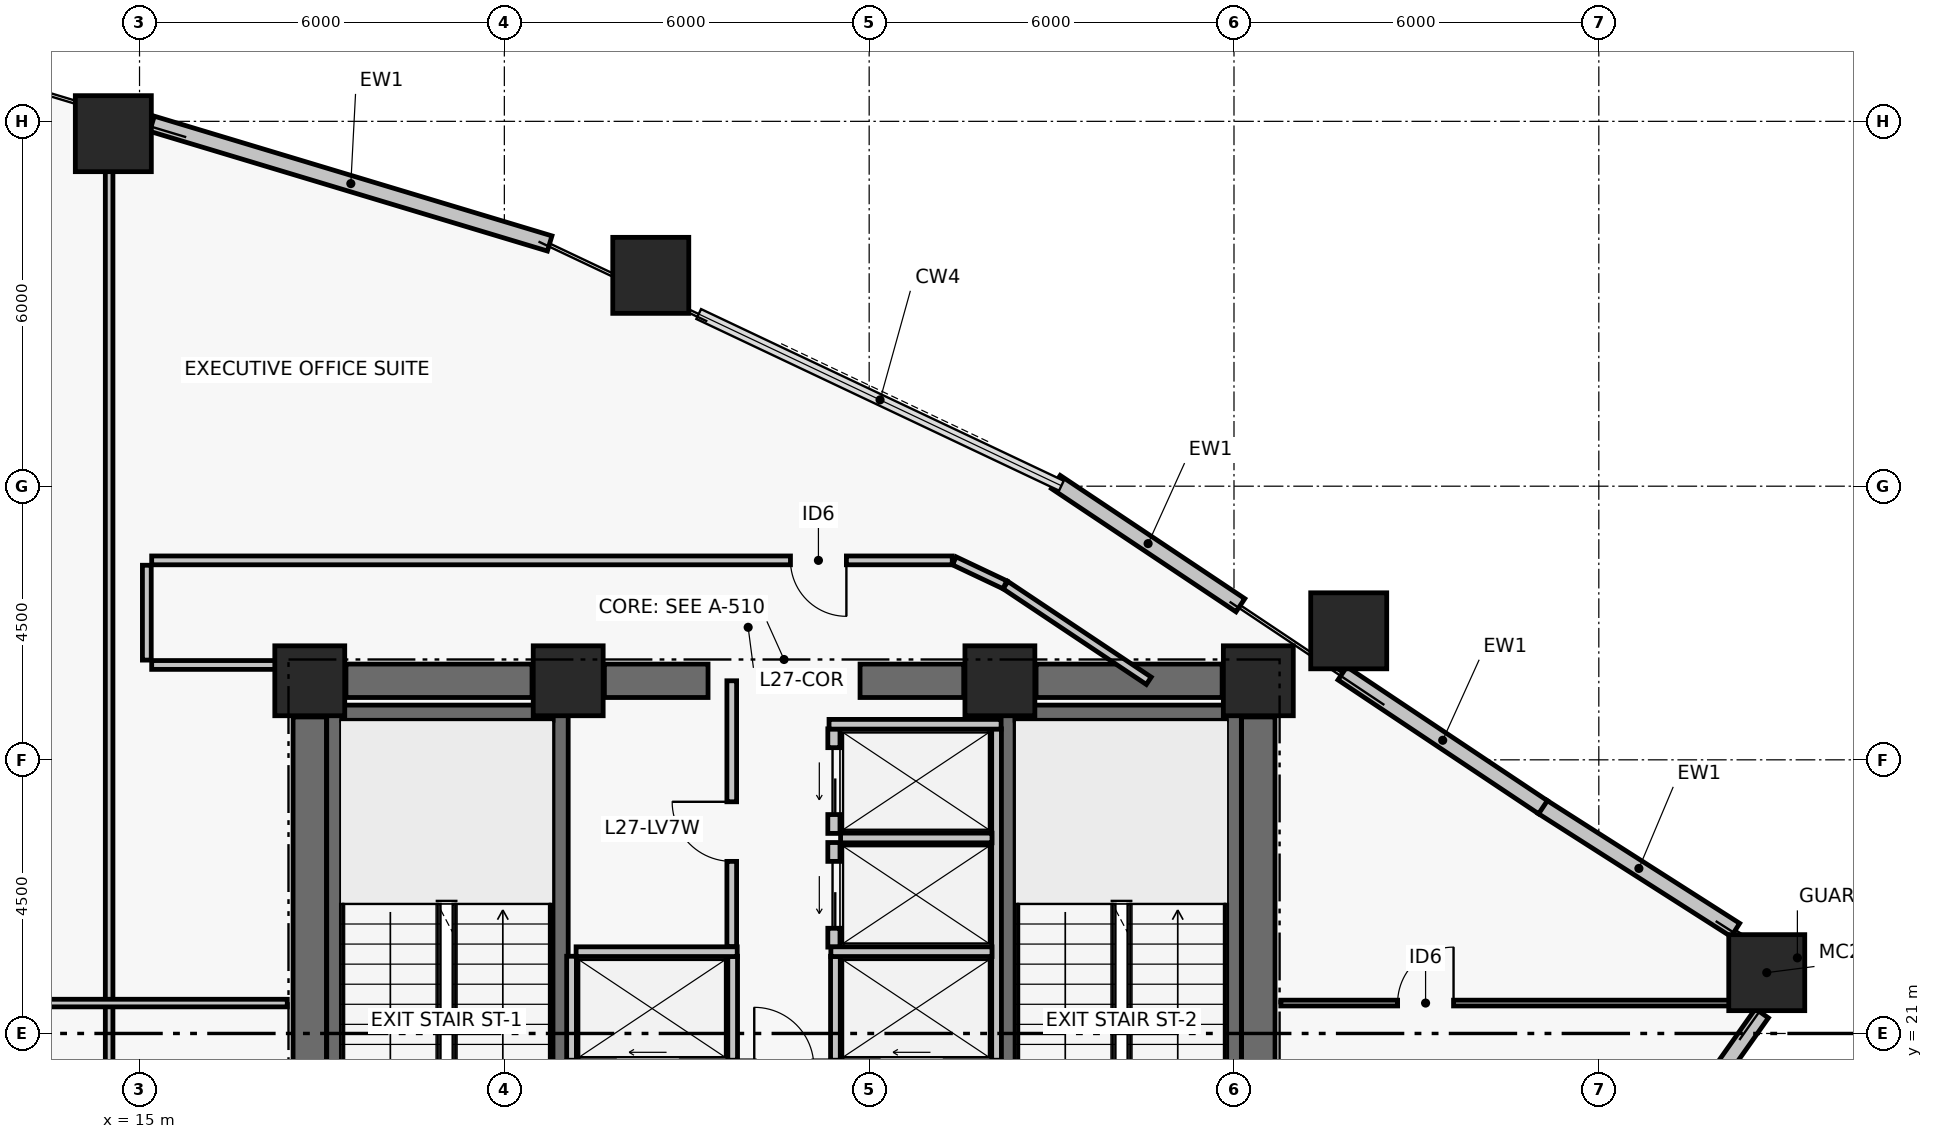
"""IFC4 building model, lengths in metres.
Left out: names, types, materials, properties, quantities, classifications, styles, units other than length and angle.
Written with IfcOpenShell. Run it as: python <this file> out.ifc"""

import sys

from ifc_helpers import new_model, si_unit, direction, frame, frame_2d, origin, origin_2d, place, context, subcontext, project, spatial, rectangle, hollow_rectangle, extrude, element, fill, save


model = new_model("IFC4")
c1 = context("Model", 3, precision=1e-05, world=origin(), true_north=direction((0.0, 1.0)))
c2 = subcontext(c1, "Body", "Model", "MODEL_VIEW")
j1 = project(units=[si_unit("LENGTHUNIT", "METRE"), si_unit("PLANEANGLEUNIT", "RADIAN")], contexts=[c1])
p1 = place(None, origin())
s1 = spatial("IfcSite", under=j1, at=p1, CompositionType="ELEMENT")
p2 = place(p1, origin())
s2 = spatial("IfcBuilding", under=s1, at=p2, CompositionType="ELEMENT")
p3 = place(p2, frame((0.0, 0.0, 111.42)))
s3 = spatial("IfcBuildingStorey", under=s2, at=p3, CompositionType="ELEMENT", Elevation=111.42)
for number, where, z_axis, x_axis in (
    (1, (17.8, 26.8, 0.0), (0.0, 0.0, 1.0), (1.0, 0.0, 0.0)),
    (2, (22.05, 26.8, 0.0), (0.0, 0.0, 1.0), (1.0, 0.0, 0.0)),
    (3, (29.15, 26.8, 0.0), (0.0, 0.0, 1.0), (1.0, 0.0, 0.0)),
    (4, (33.4, 26.8, 0.0), (0.0, 0.0, 1.0), (1.0, 0.0, 0.0)),
):
    element("IfcColumn", number, at=place(p3, frame(where, z_axis=z_axis, x_axis=x_axis)), inside=s3, PredefinedType="COLUMN", context=c2, shape_type="SweptSolid", body=[
        extrude(rectangle(XDim=1.15, YDim=1.15, at=origin_2d()), origin(), (0.0, 0.0, 1.0), 3.72),
    ])
p4 = place(p3, frame((18.395, 26.8, 0.0), z_axis=(0.0, 0.0, 1.0), x_axis=(1.0, 0.0, 0.0)))
e5 = element("IfcWall", 5, at=p4, inside=s3, PredefinedType="SHEAR", context=c2, shape_type="SweptSolid", body=[
    extrude(rectangle(XDim=3.06, YDim=0.55, at=frame_2d((1.53, 0.0))), origin(), (0.0, 0.0, 1.0), 3.47),
])
p5 = place(p3, frame((22.645, 26.8, 0.0), z_axis=(0.0, 0.0, 1.0), x_axis=(1.0, 0.0, 0.0)))
e6 = element("IfcWall", 6, at=p5, inside=s3, PredefinedType="SHEAR", context=c2, shape_type="SweptSolid", body=[
    extrude(rectangle(XDim=1.705, YDim=0.55, at=frame_2d((0.853, 0.0))), origin(), (0.0, 0.0, 1.0), 3.47),
])
p6 = place(p3, frame((26.85, 26.8, 0.0), z_axis=(0.0, 0.0, 1.0), x_axis=(1.0, 0.0, 0.0)))
e7 = element("IfcWall", 7, at=p6, inside=s3, PredefinedType="SHEAR", context=c2, shape_type="SweptSolid", body=[
    extrude(rectangle(XDim=1.705, YDim=0.55, at=frame_2d((0.853, 0.0))), origin(), (0.0, 0.0, 1.0), 3.47),
])
p7 = place(p3, frame((29.745, 26.8, 0.0), z_axis=(0.0, 0.0, 1.0), x_axis=(1.0, 0.0, 0.0)))
e8 = element("IfcWall", 8, at=p7, inside=s3, PredefinedType="SHEAR", context=c2, shape_type="SweptSolid", body=[
    extrude(rectangle(XDim=3.06, YDim=0.55, at=frame_2d((1.53, 0.0))), origin(), (0.0, 0.0, 1.0), 3.47),
])
for number, where, z_axis, x_axis in (
    (9, (17.8, 17.795, 0.0), (0.0, 0.0, 1.0), (0.0, 1.0, 0.0)),
    (10, (33.4, 17.795, 0.0), (0.0, 0.0, 1.0), (0.0, 1.0, 0.0)),
):
    element("IfcWall", number, at=place(p3, frame(where, z_axis=z_axis, x_axis=x_axis)), inside=s3, PredefinedType="SHEAR", context=c2, shape_type="SweptSolid", body=[
        extrude(rectangle(XDim=8.41, YDim=0.55, at=frame_2d((4.205, 0.0))), origin(), (0.0, 0.0, 1.0), 3.47),
    ])
p8 = place(p3, frame((18.204, 17.6, 0.0), z_axis=(0.0, 0.0, 1.0), x_axis=(0.0, 1.0, 0.0)))
e11 = element("IfcWall", 11, at=p8, inside=s3, PredefinedType="SHEAR", context=c2, shape_type="SweptSolid", body=[
    extrude(rectangle(XDim=8.8, YDim=0.25, at=frame_2d((4.4, 0.0))), origin(), (0.0, 0.0, 1.0), 3.47),
])
p9 = place(p3, frame((21.925, 17.6, 0.0), z_axis=(0.0, 0.0, 1.0), x_axis=(0.0, 1.0, 0.0)))
e12 = element("IfcWall", 12, at=p9, inside=s3, PredefinedType="SHEAR", context=c2, shape_type="SweptSolid", body=[
    extrude(rectangle(XDim=8.8, YDim=0.25, at=frame_2d((4.4, 0.0))), origin(), (0.0, 0.0, 1.0), 3.47),
])
p10 = place(p9, frame((0.35, 0.0, 0.0)))
e13 = element("IfcOpeningElement", 13, at=p10, cuts=e12, PredefinedType="OPENING", context=c2, shape_type="SweptSolid", body=[
    extrude(rectangle(XDim=1.05, YDim=2.08, at=frame_2d((0.525, 1.04))), frame((0.0, 0.135, 0.0), z_axis=(0.0, -1.0, 0.0), x_axis=(1.0, 0.0, 0.0)), (0.0, 0.0, 1.0), 0.27),
])
p11 = place(p3, frame((18.329, 26.275, 0.0), z_axis=(0.0, 0.0, 1.0), x_axis=(1.0, 0.0, 0.0)))
e14 = element("IfcWall", 14, at=p11, inside=s3, PredefinedType="SHEAR", context=c2, shape_type="SweptSolid", body=[
    extrude(rectangle(XDim=3.471, YDim=0.25, at=frame_2d((1.735, 0.0))), origin(), (0.0, 0.0, 1.0), 3.47),
])
p12 = place(p3, frame((29.275, 17.6, 0.0), z_axis=(0.0, 0.0, 1.0), x_axis=(0.0, 1.0, 0.0)))
e15 = element("IfcWall", 15, at=p12, inside=s3, PredefinedType="SHEAR", context=c2, shape_type="SweptSolid", body=[
    extrude(rectangle(XDim=8.8, YDim=0.25, at=frame_2d((4.4, 0.0))), origin(), (0.0, 0.0, 1.0), 3.47),
])
p13 = place(p12, frame((0.35, 0.0, 0.0)))
e16 = element("IfcOpeningElement", 16, at=p13, cuts=e15, PredefinedType="OPENING", context=c2, shape_type="SweptSolid", body=[
    extrude(rectangle(XDim=1.05, YDim=2.08, at=frame_2d((0.525, 1.04))), frame((0.0, 0.135, 0.0), z_axis=(0.0, -1.0, 0.0), x_axis=(1.0, 0.0, 0.0)), (0.0, 0.0, 1.0), 0.27),
])
p14 = place(p3, frame((32.996, 17.6, 0.0), z_axis=(0.0, 0.0, 1.0), x_axis=(0.0, 1.0, 0.0)))
e17 = element("IfcWall", 17, at=p14, inside=s3, PredefinedType="SHEAR", context=c2, shape_type="SweptSolid", body=[
    extrude(rectangle(XDim=8.8, YDim=0.25, at=frame_2d((4.4, 0.0))), origin(), (0.0, 0.0, 1.0), 3.47),
])
p15 = place(p3, frame((29.4, 26.275, 0.0), z_axis=(0.0, 0.0, 1.0), x_axis=(1.0, 0.0, 0.0)))
e18 = element("IfcWall", 18, at=p15, inside=s3, PredefinedType="SHEAR", context=c2, shape_type="SweptSolid", body=[
    extrude(rectangle(XDim=3.471, YDim=0.25, at=frame_2d((1.736, 0.0))), origin(), (0.0, 0.0, 1.0), 3.47),
])
for number, where, z_axis, x_axis in (
    (19, (41.762, 22.0, 0.0), (0.0, 0.0, 1.0), (1.0, 0.0, 0.0)),
    (20, (34.887, 27.622, 0.0), (0.0, 0.0, 1.0), (1.0, 0.0, 0.0)),
    (21, (23.408, 33.467, 0.0), (0.0, 0.0, 1.0), (1.0, 0.0, 0.0)),
    (22, (14.569, 35.797, 0.0), (0.0, 0.0, 1.0), (1.0, 0.0, 0.0)),
):
    element("IfcColumn", number, at=place(p3, frame(where, z_axis=z_axis, x_axis=x_axis)), inside=s3, PredefinedType="COLUMN", context=c2, shape_type="SweptSolid", body=[
        extrude(hollow_rectangle(XDim=1.25, YDim=1.25, WallThickness=0.05, at=origin_2d()), origin(), (0.0, 0.0, 1.0), 3.72),
    ])
p16 = place(p3, frame((41.682, 21.331, 0.0), z_axis=(0.0, 0.0, 1.0), x_axis=(-0.577134204686, -0.816649318729, 0.0)))
e23 = element("IfcWall", 23, at=p16, inside=s3, PredefinedType="PARTITIONING", context=c2, shape_type="SweptSolid", body=[
    extrude(rectangle(XDim=2.21, YDim=0.26, at=frame_2d((1.105, 0.0))), origin(), (0.0, 0.0, 1.0), 3.47),
])
p17 = place(p3, frame((38.072, 24.727, 0.0), z_axis=(0.0, 0.0, 1.0), x_axis=(0.843033549628, -0.537860980367, 0.0)))
e24 = element("IfcWall", 24, at=p17, inside=s3, PredefinedType="PARTITIONING", context=c2, shape_type="SweptSolid", body=[
    extrude(rectangle(XDim=3.766, YDim=0.26, at=frame_2d((1.883, 0.0))), origin(), (0.0, 0.0, 1.0), 2.9),
])
p18 = place(p3, frame((34.783, 26.922, 0.0), z_axis=(0.0, 0.0, 1.0), x_axis=(0.831718676225, -0.555197301523, 0.0)))
e25 = element("IfcWall", 25, at=p18, inside=s3, PredefinedType="PARTITIONING", context=c2, shape_type="SweptSolid", body=[
    extrude(rectangle(XDim=3.966, YDim=0.26, at=frame_2d((1.983, 0.0))), origin(), (0.0, 0.0, 1.0), 2.77),
])
p19 = place(p3, frame((30.07, 30.069, 0.0), z_axis=(0.0, 0.0, 1.0), x_axis=(0.831720838908, -0.555194061681, 0.0)))
e26 = element("IfcWall", 26, at=p19, inside=s3, PredefinedType="PARTITIONING", context=c2, shape_type="SweptSolid", body=[
    extrude(rectangle(XDim=3.65, YDim=0.26, at=frame_2d((1.825, 0.0))), origin(), (0.0, 0.0, 1.0), 2.9),
])
p20 = place(p3, frame((15.205, 35.961, 0.0), z_axis=(0.0, 0.0, 1.0), x_axis=(0.957547425539, -0.288275784351, 0.0)))
e27 = element("IfcWall", 27, at=p20, inside=s3, PredefinedType="PARTITIONING", context=c2, shape_type="SweptSolid", body=[
    extrude(rectangle(XDim=6.83, YDim=0.26, at=frame_2d((3.415, 0.0))), origin(), (0.0, 0.0, 1.0), 2.9),
])
p21 = place(p3, frame((26.42, 22.42, 0.0), z_axis=(0.0, 0.0, 1.0), x_axis=(0.0, 1.0, 0.0)))
e28 = element("IfcWall", 28, at=p21, inside=s3, PredefinedType="PARTITIONING", context=c2, shape_type="SweptSolid", body=[
    extrude(rectangle(XDim=1.72, YDim=0.2, at=frame_2d((0.86, 0.0))), origin(), (0.0, 0.0, 1.0), 3.47),
])
p22 = place(p21, frame((0.31, 0.0, 0.0)))
e29 = element("IfcOpeningElement", 29, at=p22, cuts=e28, PredefinedType="OPENING", context=c2, shape_type="SweptSolid", body=[
    extrude(rectangle(XDim=1.1, YDim=2.08, at=frame_2d((0.55, 1.04))), frame((0.0, 0.11, 0.0), z_axis=(0.0, -1.0, 0.0), x_axis=(1.0, 0.0, 0.0)), (0.0, 0.0, 1.0), 0.22),
])
p23 = place(p3, frame((26.42, 24.29, 0.0), z_axis=(0.0, 0.0, 1.0), x_axis=(0.0, 1.0, 0.0)))
e30 = element("IfcWall", 30, at=p23, inside=s3, PredefinedType="PARTITIONING", context=c2, shape_type="SweptSolid", body=[
    extrude(rectangle(XDim=1.72, YDim=0.2, at=frame_2d((0.86, 0.0))), origin(), (0.0, 0.0, 1.0), 3.47),
])
p24 = place(p23, frame((0.31, 0.0, 0.0)))
e31 = element("IfcOpeningElement", 31, at=p24, cuts=e30, PredefinedType="OPENING", context=c2, shape_type="SweptSolid", body=[
    extrude(rectangle(XDim=1.1, YDim=2.08, at=frame_2d((0.55, 1.04))), frame((0.0, 0.11, 0.0), z_axis=(0.0, -1.0, 0.0), x_axis=(1.0, 0.0, 0.0)), (0.0, 0.0, 1.0), 0.22),
])
for number, where, z_axis, x_axis in (
    (32, (22.105, 20.56, 0.0), (0.0, 0.0, 1.0), (0.0, 1.0, 0.0)),
    (33, (24.755, 20.56, 0.0), (0.0, 0.0, 1.0), (0.0, 1.0, 0.0)),
):
    element("IfcWall", number, at=place(p3, frame(where, z_axis=z_axis, x_axis=x_axis)), inside=s3, PredefinedType="PARTITIONING", context=c2, shape_type="SweptSolid", body=[
        extrude(rectangle(XDim=1.71, YDim=0.16, at=frame_2d((0.855, 0.0))), origin(), (0.0, 0.0, 1.0), 3.47),
    ])
p25 = place(p3, frame((22.18, 22.345, 0.0), z_axis=(0.0, 0.0, 1.0), x_axis=(1.0, 0.0, 0.0)))
e34 = element("IfcWall", 34, at=p25, inside=s3, PredefinedType="PARTITIONING", context=c2, shape_type="SweptSolid", body=[
    extrude(rectangle(XDim=2.65, YDim=0.16, at=frame_2d((1.325, 0.0))), origin(), (0.0, 0.0, 1.0), 3.47),
])
p26 = place(p3, frame((29.095, 20.56, 0.0), z_axis=(0.0, 0.0, 1.0), x_axis=(0.0, 1.0, 0.0)))
e35 = element("IfcWall", 35, at=p26, inside=s3, PredefinedType="PARTITIONING", context=c2, shape_type="SweptSolid", body=[
    extrude(rectangle(XDim=5.45, YDim=0.16, at=frame_2d((2.725, 0.0))), origin(), (0.0, 0.0, 1.0), 3.47),
])
p27 = place(p3, frame((26.445, 20.56, 0.0), z_axis=(0.0, 0.0, 1.0), x_axis=(0.0, 1.0, 0.0)))
e36 = element("IfcWall", 36, at=p27, inside=s3, PredefinedType="PARTITIONING", context=c2, shape_type="SweptSolid", body=[
    extrude(rectangle(XDim=1.71, YDim=0.16, at=frame_2d((0.855, 0.0))), origin(), (0.0, 0.0, 1.0), 3.47),
])
p28 = place(p3, frame((26.37, 22.345, 0.0), z_axis=(0.0, 0.0, 1.0), x_axis=(1.0, 0.0, 0.0)))
e37 = element("IfcWall", 37, at=p28, inside=s3, PredefinedType="PARTITIONING", context=c2, shape_type="SweptSolid", body=[
    extrude(rectangle(XDim=2.65, YDim=0.16, at=frame_2d((1.325, 0.0))), origin(), (0.0, 0.0, 1.0), 3.47),
])
p29 = place(p3, frame((26.53, 24.215, 0.0), z_axis=(0.0, 0.0, 1.0), x_axis=(1.0, 0.0, 0.0)))
e38 = element("IfcWall", 38, at=p29, inside=s3, PredefinedType="PARTITIONING", context=c2, shape_type="SweptSolid", body=[
    extrude(rectangle(XDim=2.49, YDim=0.16, at=frame_2d((1.245, 0.0))), origin(), (0.0, 0.0, 1.0), 3.47),
])
p30 = place(p3, frame((26.34, 26.085, 0.0), z_axis=(0.0, 0.0, 1.0), x_axis=(1.0, 0.0, 0.0)))
e39 = element("IfcWall", 39, at=p30, inside=s3, PredefinedType="PARTITIONING", context=c2, shape_type="SweptSolid", body=[
    extrude(rectangle(XDim=2.83, YDim=0.16, at=frame_2d((1.415, 0.0))), origin(), (0.0, 0.0, 1.0), 3.47),
])
p31 = place(p3, frame((24.74, 22.43, 0.0), z_axis=(0.0, 0.0, 1.0), x_axis=(0.0, 1.0, 0.0)))
e40 = element("IfcWall", 40, at=p31, inside=s3, PredefinedType="PARTITIONING", context=c2, shape_type="SweptSolid", body=[
    extrude(rectangle(XDim=4.37, YDim=0.16, at=frame_2d((2.185, 0.0))), origin(), (0.0, 0.0, 1.0), 2.6),
])
p32 = place(p31, frame((1.4, 0.0, 0.0)))
e41 = element("IfcOpeningElement", 41, at=p32, cuts=e40, PredefinedType="OPENING", context=c2, shape_type="SweptSolid", body=[
    extrude(rectangle(XDim=0.98, YDim=2.06, at=frame_2d((0.49, 1.03))), frame((0.0, 0.09, 0.0), z_axis=(0.0, -1.0, 0.0), x_axis=(1.0, 0.0, 0.0)), (0.0, 0.0, 1.0), 0.18),
])
p33 = place(p3, frame((31.598, 26.8, 0.0), z_axis=(0.0, 0.0, 1.0), x_axis=(-0.831758510993, 0.555137622028, 0.0)))
e42 = element("IfcWall", 42, at=p33, inside=s3, PredefinedType="PARTITIONING", context=c2, shape_type="SweptSolid", body=[
    extrude(rectangle(XDim=2.833, YDim=0.145, at=frame_2d((1.417, 0.0))), origin(), (0.0, 0.0, 1.0), 2.6),
])
p34 = place(p3, frame((29.232, 28.379, 0.0), z_axis=(0.0, 0.0, 1.0), x_axis=(-0.903829701814, 0.427892358098, 0.0)))
e43 = element("IfcWall", 43, at=p34, inside=s3, PredefinedType="PARTITIONING", context=c2, shape_type="SweptSolid", body=[
    extrude(rectangle(XDim=0.92, YDim=0.145, at=frame_2d((0.46, 0.0))), origin(), (0.0, 0.0, 1.0), 3.47),
])
p35 = place(p3, frame((28.366, 28.78, 0.0), z_axis=(0.0, 0.0, 1.0), x_axis=(-1.0, 0.0, 0.0)))
e44 = element("IfcWall", 44, at=p35, inside=s3, PredefinedType="PARTITIONING", context=c2, shape_type="SweptSolid", body=[
    extrude(rectangle(XDim=13.166, YDim=0.145, at=frame_2d((6.583, 0.0))), origin(), (0.0, 0.0, 1.0), 2.65),
])
p36 = place(p35, frame((1.741, 0.0, 0.0)))
e45 = element("IfcOpeningElement", 45, at=p36, cuts=e44, PredefinedType="OPENING", context=c2, shape_type="SweptSolid", body=[
    extrude(rectangle(XDim=0.92, YDim=2.05, at=frame_2d((0.46, 1.025))), frame((0.0, 0.083, 0.0), z_axis=(0.0, -1.0, 0.0), x_axis=(1.0, 0.0, 0.0)), (0.0, 0.0, 1.0), 0.165),
])
p37 = place(p3, frame((15.12, 28.7, 0.0), z_axis=(0.0, 0.0, 1.0), x_axis=(0.0, -1.0, 0.0)))
e46 = element("IfcWall", 46, at=p37, inside=s3, PredefinedType="PARTITIONING", context=c2, shape_type="SweptSolid", body=[
    extrude(rectangle(XDim=1.56, YDim=0.145, at=frame_2d((0.78, 0.0))), origin(), (0.0, 0.0, 1.0), 2.65),
])
p38 = place(p3, frame((15.2, 27.06, 0.0), z_axis=(0.0, 0.0, 1.0), x_axis=(1.0, 0.0, 0.0)))
e47 = element("IfcWall", 47, at=p38, inside=s3, PredefinedType="PARTITIONING", context=c2, shape_type="SweptSolid", body=[
    extrude(rectangle(XDim=2.18, YDim=0.145, at=frame_2d((1.09, 0.0))), origin(), (0.0, 0.0, 1.0), 2.65),
])
p39 = place(p3, frame((14.5, 7.535, 0.0), z_axis=(0.0, 0.0, 1.0), x_axis=(0.0, 1.0, 0.0)))
e48 = element("IfcWall", 48, at=p39, inside=s3, PredefinedType="PARTITIONING", context=c2, shape_type="SweptSolid", body=[
    extrude(rectangle(XDim=28.648, YDim=0.125, at=frame_2d((14.324, 0.0))), origin(), (0.0, 0.0, 1.0), 2.2),
])
p40 = place(p39, frame((11.325, 0.0, 0.0)))
e49 = element("IfcOpeningElement", 49, at=p40, cuts=e48, PredefinedType="OPENING", context=c2, shape_type="SweptSolid", body=[
    extrude(rectangle(XDim=0.92, YDim=2.05, at=frame_2d((0.46, 1.025))), frame((0.0, 0.073, 0.0), z_axis=(0.0, -1.0, 0.0), x_axis=(1.0, 0.0, 0.0)), (0.0, 0.0, 1.0), 0.145),
])
p41 = place(p3, frame((3.128, 21.5, 0.0), z_axis=(0.0, 0.0, 1.0), x_axis=(1.0, 0.0, 0.0)))
e50 = element("IfcWall", 50, at=p41, inside=s3, PredefinedType="PARTITIONING", context=c2, shape_type="SweptSolid", body=[
    extrude(rectangle(XDim=14.302, YDim=0.125, at=frame_2d((7.151, 0.0))), origin(), (0.0, 0.0, 1.0), 2.6),
])
p42 = place(p41, frame((0.28, 0.0, 0.0)))
e51 = element("IfcOpeningElement", 51, at=p42, cuts=e50, PredefinedType="OPENING", context=c2, shape_type="SweptSolid", body=[
    extrude(rectangle(XDim=0.92, YDim=2.05, at=frame_2d((0.46, 1.025))), frame((0.0, 0.073, 0.0), z_axis=(0.0, -1.0, 0.0), x_axis=(1.0, 0.0, 0.0)), (0.0, 0.0, 1.0), 0.145),
])
p43 = place(p3, frame((33.77, 21.5, 0.0), z_axis=(0.0, 0.0, 1.0), x_axis=(1.0, 0.0, 0.0)))
e52 = element("IfcWall", 52, at=p43, inside=s3, PredefinedType="PARTITIONING", context=c2, shape_type="SweptSolid", body=[
    extrude(rectangle(XDim=8.044, YDim=0.095, at=frame_2d((4.022, 0.0))), origin(), (0.0, 0.0, 1.0), 2.6),
])
p44 = place(p43, frame((1.921, 0.0, 0.0)))
e53 = element("IfcOpeningElement", 53, at=p44, cuts=e52, PredefinedType="OPENING", context=c2, shape_type="SweptSolid", body=[
    extrude(rectangle(XDim=0.92, YDim=2.05, at=frame_2d((0.46, 1.025))), frame((0.0, 0.057, 0.0), z_axis=(0.0, -1.0, 0.0), x_axis=(1.0, 0.0, 0.0)), (0.0, 0.0, 1.0), 0.115),
])
p45 = place(p22, origin())
e54 = element("IfcDoor", 54, at=p45, inside=s3, OperationType="DOUBLE_DOOR_SLIDING", PredefinedType="DOOR", context=c2, shape_type="SweptSolid", body=[
    extrude(rectangle(XDim=1.1, YDim=2.08, at=frame_2d((0.55, 1.04))), frame((0.0, 0.025, 0.0), z_axis=(0.0, -1.0, 0.0), x_axis=(1.0, 0.0, 0.0)), (0.0, 0.0, 1.0), 0.05),
])
fill(e29, e54)
p46 = place(p24, origin())
e55 = element("IfcDoor", 55, at=p46, inside=s3, OperationType="DOUBLE_DOOR_SLIDING", PredefinedType="DOOR", context=c2, shape_type="SweptSolid", body=[
    extrude(rectangle(XDim=1.1, YDim=2.08, at=frame_2d((0.55, 1.04))), frame((0.0, 0.025, 0.0), z_axis=(0.0, -1.0, 0.0), x_axis=(1.0, 0.0, 0.0)), (0.0, 0.0, 1.0), 0.05),
])
fill(e31, e55)
p47 = place(p32, origin())
e56 = element("IfcDoor", 56, at=p47, inside=s3, OperationType="SINGLE_SWING_RIGHT", PredefinedType="DOOR", context=c2, shape_type="SweptSolid", body=[
    extrude(rectangle(XDim=0.98, YDim=2.06, at=frame_2d((0.49, 1.03))), frame((0.0, 0.025, 0.0), z_axis=(0.0, -1.0, 0.0), x_axis=(1.0, 0.0, 0.0)), (0.0, 0.0, 1.0), 0.05),
])
fill(e41, e56)
p48 = place(p36, origin())
e57 = element("IfcDoor", 57, at=p48, inside=s3, OperationType="SINGLE_SWING_LEFT", PredefinedType="DOOR", context=c2, shape_type="SweptSolid", body=[
    extrude(rectangle(XDim=0.92, YDim=2.05, at=frame_2d((0.46, 1.025))), frame((0.0, 0.025, 0.0), z_axis=(0.0, -1.0, 0.0), x_axis=(1.0, 0.0, 0.0)), (0.0, 0.0, 1.0), 0.05),
])
fill(e45, e57)
p49 = place(p44, origin())
e58 = element("IfcDoor", 58, at=p49, inside=s3, OperationType="SINGLE_SWING_RIGHT", PredefinedType="DOOR", context=c2, shape_type="SweptSolid", body=[
    extrude(rectangle(XDim=0.92, YDim=2.05, at=frame_2d((0.46, 1.025))), frame((0.0, 0.025, 0.0), z_axis=(0.0, -1.0, 0.0), x_axis=(1.0, 0.0, 0.0)), (0.0, 0.0, 1.0), 0.05),
])
fill(e53, e58)
save(model, sys.argv[1])
